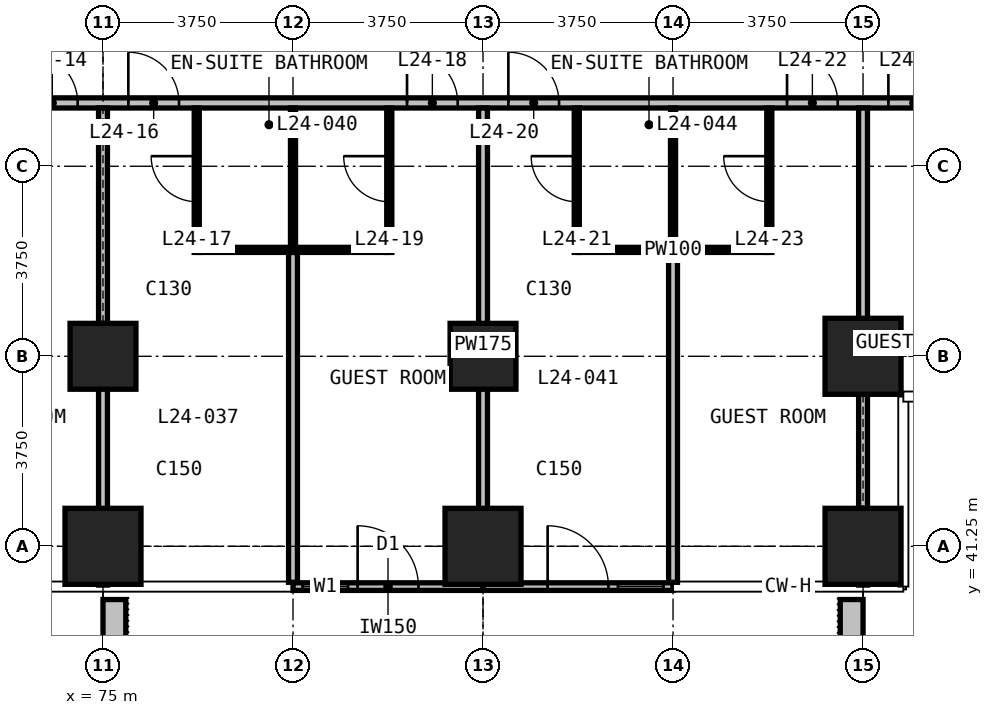
"""IFC4 building model, lengths in metres.
Left out: names, types, materials, properties, quantities, classifications, styles, units other than length and angle.
Written with IfcOpenShell. Run it as: python <this file> out.ifc"""

import sys

from ifc_helpers import new_model, si_unit, direction, frame, frame_2d, origin, origin_2d, place, context, subcontext, project, spatial, rectangle, extrude, element, fill, save


model = new_model("IFC4")
c1 = context("Model", 3, precision=1e-05, world=origin(), true_north=direction((0.0, 1.0)))
c2 = subcontext(c1, "Body", "Model", "MODEL_VIEW")
j1 = project(units=[si_unit("LENGTHUNIT", "METRE"), si_unit("PLANEANGLEUNIT", "RADIAN")], contexts=[c1])
p1 = place(None, origin())
s1 = spatial("IfcSite", under=j1, at=p1, CompositionType="ELEMENT")
p2 = place(p1, origin())
s2 = spatial("IfcBuilding", under=s1, at=p2, CompositionType="ELEMENT")
p3 = place(p2, frame((0.0, 0.0, 98.9)))
s3 = spatial("IfcBuildingStorey", under=s2, at=p3, CompositionType="ELEMENT", Elevation=98.9)
p4 = place(p3, frame((75.0, 41.25, 0.0), z_axis=(0.0, 0.0, 1.0), x_axis=(1.0, 0.0, 0.0)))
e1 = element("IfcColumn", 1, at=p4, inside=s3, PredefinedType="COLUMN", context=c2, shape_type="SweptSolid", body=[
    extrude(rectangle(XDim=1.5, YDim=1.5, at=origin_2d()), origin(), (0.0, 0.0, 1.0), 3.3),
])
p5 = place(p3, frame((75.0, 45.0, 0.0), z_axis=(0.0, 0.0, 1.0), x_axis=(1.0, 0.0, 0.0)))
e2 = element("IfcColumn", 2, at=p5, inside=s3, PredefinedType="COLUMN", context=c2, shape_type="SweptSolid", body=[
    extrude(rectangle(XDim=1.3, YDim=1.3, at=origin_2d()), origin(), (0.0, 0.0, 1.0), 3.3),
])
p6 = place(p3, frame((82.5, 41.25, 0.0), z_axis=(0.0, 0.0, 1.0), x_axis=(1.0, 0.0, 0.0)))
e3 = element("IfcColumn", 3, at=p6, inside=s3, PredefinedType="COLUMN", context=c2, shape_type="SweptSolid", body=[
    extrude(rectangle(XDim=1.5, YDim=1.5, at=origin_2d()), origin(), (0.0, 0.0, 1.0), 3.3),
])
p7 = place(p3, frame((82.5, 45.0, 0.0), z_axis=(0.0, 0.0, 1.0), x_axis=(1.0, 0.0, 0.0)))
e4 = element("IfcColumn", 4, at=p7, inside=s3, PredefinedType="COLUMN", context=c2, shape_type="SweptSolid", body=[
    extrude(rectangle(XDim=1.3, YDim=1.3, at=origin_2d()), origin(), (0.0, 0.0, 1.0), 3.3),
])
for number, where, z_axis, x_axis in (
    (5, (90.0, 41.25, 0.0), (0.0, 0.0, 1.0), (1.0, 0.0, 0.0)),
    (6, (90.0, 45.0, 0.0), (0.0, 0.0, 1.0), (1.0, 0.0, 0.0)),
):
    element("IfcColumn", number, at=place(p3, frame(where, z_axis=z_axis, x_axis=x_axis)), inside=s3, PredefinedType="COLUMN", context=c2, shape_type="SweptSolid", body=[
        extrude(rectangle(XDim=1.5, YDim=1.5, at=origin_2d()), origin(), (0.0, 0.0, 1.0), 3.3),
    ])
p8 = place(p3, frame((78.75, 40.455, 0.0), z_axis=(0.0, 0.0, 1.0), x_axis=(1.0, 0.0, 0.0)))
e7 = element("IfcWall", 7, at=p8, inside=s3, PredefinedType="SOLIDWALL", context=c2, shape_type="SweptSolid", body=[
    extrude(rectangle(XDim=3.75, YDim=0.15, at=frame_2d((1.875, 0.0))), origin(), (0.0, 0.0, 1.0), 2.95),
])
p9 = place(p8, frame((0.188, 0.0, 0.1)))
e8 = element("IfcOpeningElement", 8, at=p9, cuts=e7, PredefinedType="OPENING", context=c2, shape_type="SweptSolid", body=[
    extrude(rectangle(XDim=0.9, YDim=2.4, at=frame_2d((0.45, 1.2))), frame((0.0, 0.085, 0.0), z_axis=(0.0, -1.0, 0.0), x_axis=(1.0, 0.0, 0.0)), (0.0, 0.0, 1.0), 0.17),
])
p10 = place(p8, frame((1.275, 0.0, 0.0)))
e9 = element("IfcOpeningElement", 9, at=p10, cuts=e7, PredefinedType="OPENING", context=c2, shape_type="SweptSolid", body=[
    extrude(rectangle(XDim=1.2, YDim=2.4, at=frame_2d((0.6, 1.2))), frame((0.0, 0.085, 0.0), z_axis=(0.0, -1.0, 0.0), x_axis=(1.0, 0.0, 0.0)), (0.0, 0.0, 1.0), 0.17),
])
p11 = place(p3, frame((82.5, 40.455, 0.0), z_axis=(0.0, 0.0, 1.0), x_axis=(1.0, 0.0, 0.0)))
e10 = element("IfcWall", 10, at=p11, inside=s3, PredefinedType="SOLIDWALL", context=c2, shape_type="SweptSolid", body=[
    extrude(rectangle(XDim=3.75, YDim=0.15, at=frame_2d((1.875, 0.0))), origin(), (0.0, 0.0, 1.0), 2.95),
])
p12 = place(p11, frame((1.275, 0.0, 0.0)))
e11 = element("IfcOpeningElement", 11, at=p12, cuts=e10, PredefinedType="OPENING", context=c2, shape_type="SweptSolid", body=[
    extrude(rectangle(XDim=1.2, YDim=2.4, at=frame_2d((0.6, 1.2))), frame((0.0, 0.085, 0.0), z_axis=(0.0, -1.0, 0.0), x_axis=(1.0, 0.0, 0.0)), (0.0, 0.0, 1.0), 0.17),
])
p13 = place(p11, frame((2.663, 0.0, 0.1)))
e12 = element("IfcOpeningElement", 12, at=p13, cuts=e10, PredefinedType="OPENING", context=c2, shape_type="SweptSolid", body=[
    extrude(rectangle(XDim=0.9, YDim=2.4, at=frame_2d((0.45, 1.2))), frame((0.0, 0.085, 0.0), z_axis=(0.0, -1.0, 0.0), x_axis=(1.0, 0.0, 0.0)), (0.0, 0.0, 1.0), 0.17),
])
for number, where, z_axis, x_axis in (
    (13, (75.225, 40.2, 0.0), (0.0, 0.0, 1.0), (0.0, -1.0, 0.0)),
    (14, (89.775, 40.2, 0.0), (0.0, 0.0, 1.0), (0.0, -1.0, 0.0)),
):
    element("IfcWall", number, at=place(p3, frame(where, z_axis=z_axis, x_axis=x_axis)), inside=s3, PredefinedType="USERDEFINED", context=c2, shape_type="SweptSolid", body=[
        extrude(rectangle(XDim=2.35, YDim=0.45, at=frame_2d((1.175, 0.0))), origin(), (0.0, 0.0, 1.0), 1.1),
    ])
p14 = place(p3, frame((52.575, 50.0, 0.0), z_axis=(0.0, 0.0, 1.0), x_axis=(1.0, 0.0, 0.0)))
e15 = element("IfcWall", 15, at=p14, inside=s3, PredefinedType="PARTITIONING", context=c2, shape_type="SweptSolid", body=[
    extrude(rectangle(XDim=44.85, YDim=0.2, at=frame_2d((22.425, 0.0))), origin(), (0.0, 0.0, 1.0), 2.95),
])
p15 = place(p14, frame((5.925, 0.0, 0.0)))
e16 = element("IfcOpeningElement", 16, at=p15, cuts=e15, PredefinedType="OPENING", context=c2, shape_type="SweptSolid", body=[
    extrude(rectangle(XDim=1.0, YDim=2.2, at=frame_2d((0.5, 1.1))), frame((0.0, 0.11, 0.0), z_axis=(0.0, -1.0, 0.0), x_axis=(1.0, 0.0, 0.0)), (0.0, 0.0, 1.0), 0.22),
])
p16 = place(p14, frame((7.925, 0.0, 0.0)))
e17 = element("IfcOpeningElement", 17, at=p16, cuts=e15, PredefinedType="OPENING", context=c2, shape_type="SweptSolid", body=[
    extrude(rectangle(XDim=1.0, YDim=2.2, at=frame_2d((0.5, 1.1))), frame((0.0, 0.11, 0.0), z_axis=(0.0, -1.0, 0.0), x_axis=(1.0, 0.0, 0.0)), (0.0, 0.0, 1.0), 0.22),
])
p17 = place(p14, frame((13.425, 0.0, 0.0)))
e18 = element("IfcOpeningElement", 18, at=p17, cuts=e15, PredefinedType="OPENING", context=c2, shape_type="SweptSolid", body=[
    extrude(rectangle(XDim=1.0, YDim=2.2, at=frame_2d((0.5, 1.1))), frame((0.0, 0.11, 0.0), z_axis=(0.0, -1.0, 0.0), x_axis=(1.0, 0.0, 0.0)), (0.0, 0.0, 1.0), 0.22),
])
p18 = place(p14, frame((15.425, 0.0, 0.0)))
e19 = element("IfcOpeningElement", 19, at=p18, cuts=e15, PredefinedType="OPENING", context=c2, shape_type="SweptSolid", body=[
    extrude(rectangle(XDim=1.0, YDim=2.2, at=frame_2d((0.5, 1.1))), frame((0.0, 0.11, 0.0), z_axis=(0.0, -1.0, 0.0), x_axis=(1.0, 0.0, 0.0)), (0.0, 0.0, 1.0), 0.22),
])
p19 = place(p14, frame((20.925, 0.0, 0.0)))
e20 = element("IfcOpeningElement", 20, at=p19, cuts=e15, PredefinedType="OPENING", context=c2, shape_type="SweptSolid", body=[
    extrude(rectangle(XDim=1.0, YDim=2.2, at=frame_2d((0.5, 1.1))), frame((0.0, 0.11, 0.0), z_axis=(0.0, -1.0, 0.0), x_axis=(1.0, 0.0, 0.0)), (0.0, 0.0, 1.0), 0.22),
])
p20 = place(p14, frame((22.925, 0.0, 0.0)))
e21 = element("IfcOpeningElement", 21, at=p20, cuts=e15, PredefinedType="OPENING", context=c2, shape_type="SweptSolid", body=[
    extrude(rectangle(XDim=1.0, YDim=2.2, at=frame_2d((0.5, 1.1))), frame((0.0, 0.11, 0.0), z_axis=(0.0, -1.0, 0.0), x_axis=(1.0, 0.0, 0.0)), (0.0, 0.0, 1.0), 0.22),
])
p21 = place(p14, frame((28.425, 0.0, 0.0)))
e22 = element("IfcOpeningElement", 22, at=p21, cuts=e15, PredefinedType="OPENING", context=c2, shape_type="SweptSolid", body=[
    extrude(rectangle(XDim=1.0, YDim=2.2, at=frame_2d((0.5, 1.1))), frame((0.0, 0.11, 0.0), z_axis=(0.0, -1.0, 0.0), x_axis=(1.0, 0.0, 0.0)), (0.0, 0.0, 1.0), 0.22),
])
p22 = place(p14, frame((30.425, 0.0, 0.0)))
e23 = element("IfcOpeningElement", 23, at=p22, cuts=e15, PredefinedType="OPENING", context=c2, shape_type="SweptSolid", body=[
    extrude(rectangle(XDim=1.0, YDim=2.2, at=frame_2d((0.5, 1.1))), frame((0.0, 0.11, 0.0), z_axis=(0.0, -1.0, 0.0), x_axis=(1.0, 0.0, 0.0)), (0.0, 0.0, 1.0), 0.22),
])
p23 = place(p14, frame((35.925, 0.0, 0.0)))
e24 = element("IfcOpeningElement", 24, at=p23, cuts=e15, PredefinedType="OPENING", context=c2, shape_type="SweptSolid", body=[
    extrude(rectangle(XDim=1.0, YDim=2.2, at=frame_2d((0.5, 1.1))), frame((0.0, 0.11, 0.0), z_axis=(0.0, -1.0, 0.0), x_axis=(1.0, 0.0, 0.0)), (0.0, 0.0, 1.0), 0.22),
])
p24 = place(p14, frame((37.925, 0.0, 0.0)))
e25 = element("IfcOpeningElement", 25, at=p24, cuts=e15, PredefinedType="OPENING", context=c2, shape_type="SweptSolid", body=[
    extrude(rectangle(XDim=1.0, YDim=2.2, at=frame_2d((0.5, 1.1))), frame((0.0, 0.11, 0.0), z_axis=(0.0, -1.0, 0.0), x_axis=(1.0, 0.0, 0.0)), (0.0, 0.0, 1.0), 0.22),
])
p25 = place(p14, frame((1.4, 0.0, 0.0)))
e26 = element("IfcOpeningElement", 26, at=p25, cuts=e15, PredefinedType="OPENING", context=c2, shape_type="SweptSolid", body=[
    extrude(rectangle(XDim=0.9, YDim=2.2, at=frame_2d((0.45, 1.1))), frame((0.0, 0.11, 0.0), z_axis=(0.0, -1.0, 0.0), x_axis=(1.0, 0.0, 0.0)), (0.0, 0.0, 1.0), 0.22),
])
p26 = place(p14, frame((42.575, 0.0, 0.0)))
e27 = element("IfcOpeningElement", 27, at=p26, cuts=e15, PredefinedType="OPENING", context=c2, shape_type="SweptSolid", body=[
    extrude(rectangle(XDim=0.9, YDim=2.2, at=frame_2d((0.45, 1.1))), frame((0.0, 0.11, 0.0), z_axis=(0.0, -1.0, 0.0), x_axis=(1.0, 0.0, 0.0)), (0.0, 0.0, 1.0), 0.22),
])
p27 = place(p3, frame((75.0, 40.485, 0.0), z_axis=(0.0, 0.0, 1.0), x_axis=(0.0, 1.0, 0.0)))
e28 = element("IfcWall", 28, at=p27, inside=s3, PredefinedType="PARTITIONING", context=c2, shape_type="SweptSolid", body=[
    extrude(rectangle(XDim=5.164, YDim=0.175, at=frame_2d((2.582, 0.0))), origin(), (0.0, 0.0, 1.0), 2.95),
])
p28 = place(p3, frame((75.0, 45.649, 0.0), z_axis=(0.0, 0.0, 1.0), x_axis=(0.0, 1.0, 0.0)))
e29 = element("IfcWall", 29, at=p28, inside=s3, PredefinedType="PARTITIONING", context=c2, shape_type="SweptSolid", body=[
    extrude(rectangle(XDim=4.251, YDim=0.175, at=frame_2d((2.125, 0.0))), origin(), (0.0, 0.0, 1.0), 2.05),
])
p29 = place(p3, frame((78.75, 40.54, 0.0), z_axis=(0.0, 0.0, 1.0), x_axis=(0.0, 1.0, 0.0)))
e30 = element("IfcWall", 30, at=p29, inside=s3, PredefinedType="PARTITIONING", context=c2, shape_type="SweptSolid", body=[
    extrude(rectangle(XDim=6.51, YDim=0.175, at=frame_2d((3.255, 0.0))), origin(), (0.0, 0.0, 1.0), 2.95),
])
p30 = place(p3, frame((82.5, 40.54, 0.0), z_axis=(0.0, 0.0, 1.0), x_axis=(0.0, 1.0, 0.0)))
e31 = element("IfcWall", 31, at=p30, inside=s3, PredefinedType="PARTITIONING", context=c2, shape_type="SweptSolid", body=[
    extrude(rectangle(XDim=9.36, YDim=0.175, at=frame_2d((4.68, 0.0))), origin(), (0.0, 0.0, 1.0), 2.95),
])
p31 = place(p3, frame((86.25, 40.54, 0.0), z_axis=(0.0, 0.0, 1.0), x_axis=(0.0, 1.0, 0.0)))
e32 = element("IfcWall", 32, at=p31, inside=s3, PredefinedType="PARTITIONING", context=c2, shape_type="SweptSolid", body=[
    extrude(rectangle(XDim=6.51, YDim=0.175, at=frame_2d((3.255, 0.0))), origin(), (0.0, 0.0, 1.0), 2.95),
])
p32 = place(p3, frame((90.0, 40.485, 0.0), z_axis=(0.0, 0.0, 1.0), x_axis=(0.0, 1.0, 0.0)))
e33 = element("IfcWall", 33, at=p32, inside=s3, PredefinedType="PARTITIONING", context=c2, shape_type="SweptSolid", body=[
    extrude(rectangle(XDim=1.515, YDim=0.175, at=frame_2d((0.757, 0.0))), origin(), (0.0, 0.0, 1.0), 2.95),
])
p33 = place(p3, frame((90.0, 42.0, 0.0), z_axis=(0.0, 0.0, 1.0), x_axis=(0.0, 1.0, 0.0)))
e34 = element("IfcWall", 34, at=p33, inside=s3, PredefinedType="PARTITIONING", context=c2, shape_type="SweptSolid", body=[
    extrude(rectangle(XDim=2.251, YDim=0.175, at=frame_2d((1.125, 0.0))), origin(), (0.0, 0.0, 1.0), 2.15),
])
p34 = place(p3, frame((90.0, 44.251, 0.0), z_axis=(0.0, 0.0, 1.0), x_axis=(0.0, 1.0, 0.0)))
e35 = element("IfcWall", 35, at=p34, inside=s3, PredefinedType="PARTITIONING", context=c2, shape_type="SweptSolid", body=[
    extrude(rectangle(XDim=5.649, YDim=0.175, at=frame_2d((2.824, 0.0))), origin(), (0.0, 0.0, 1.0), 2.95),
])
for number, where, z_axis, x_axis in (
    (36, (76.9, 47.1, 0.0), (0.0, 0.0, 1.0), (1.0, 0.0, 0.0)),
    (37, (84.4, 47.1, 0.0), (0.0, 0.0, 1.0), (1.0, 0.0, 0.0)),
):
    element("IfcWall", number, at=place(p3, frame(where, z_axis=z_axis, x_axis=x_axis)), inside=s3, PredefinedType="PARTITIONING", context=c2, shape_type="SweptSolid", body=[
        extrude(rectangle(XDim=3.7, YDim=0.1, at=frame_2d((1.85, 0.0))), origin(), (0.0, 0.0, 1.0), 2.95),
    ])
p35 = place(p3, frame((76.85, 47.05, 0.0), z_axis=(0.0, 0.0, 1.0), x_axis=(0.0, 1.0, 0.0)))
e38 = element("IfcWall", 38, at=p35, inside=s3, PredefinedType="PARTITIONING", context=c2, shape_type="SweptSolid", body=[
    extrude(rectangle(XDim=2.85, YDim=0.1, at=frame_2d((1.425, 0.0))), origin(), (0.0, 0.0, 1.0), 2.95),
])
p36 = place(p35, frame((1.0, 0.0, 0.0)))
e39 = element("IfcOpeningElement", 39, at=p36, cuts=e38, PredefinedType="OPENING", context=c2, shape_type="SweptSolid", body=[
    extrude(rectangle(XDim=0.9, YDim=2.2, at=frame_2d((0.45, 1.1))), frame((0.0, 0.06, 0.0), z_axis=(0.0, -1.0, 0.0), x_axis=(1.0, 0.0, 0.0)), (0.0, 0.0, 1.0), 0.12),
])
p37 = place(p3, frame((78.75, 47.15, 0.0), z_axis=(0.0, 0.0, 1.0), x_axis=(0.0, 1.0, 0.0)))
e40 = element("IfcWall", 40, at=p37, inside=s3, PredefinedType="PARTITIONING", context=c2, shape_type="SweptSolid", body=[
    extrude(rectangle(XDim=2.75, YDim=0.1, at=frame_2d((1.375, 0.0))), origin(), (0.0, 0.0, 1.0), 2.95),
])
p38 = place(p3, frame((80.65, 47.05, 0.0), z_axis=(0.0, 0.0, 1.0), x_axis=(0.0, 1.0, 0.0)))
e41 = element("IfcWall", 41, at=p38, inside=s3, PredefinedType="PARTITIONING", context=c2, shape_type="SweptSolid", body=[
    extrude(rectangle(XDim=2.85, YDim=0.1, at=frame_2d((1.425, 0.0))), origin(), (0.0, 0.0, 1.0), 2.95),
])
p39 = place(p38, frame((1.0, 0.0, 0.0)))
e42 = element("IfcOpeningElement", 42, at=p39, cuts=e41, PredefinedType="OPENING", context=c2, shape_type="SweptSolid", body=[
    extrude(rectangle(XDim=0.9, YDim=2.2, at=frame_2d((0.45, 1.1))), frame((0.0, 0.06, 0.0), z_axis=(0.0, -1.0, 0.0), x_axis=(1.0, 0.0, 0.0)), (0.0, 0.0, 1.0), 0.12),
])
p40 = place(p3, frame((84.35, 47.05, 0.0), z_axis=(0.0, 0.0, 1.0), x_axis=(0.0, 1.0, 0.0)))
e43 = element("IfcWall", 43, at=p40, inside=s3, PredefinedType="PARTITIONING", context=c2, shape_type="SweptSolid", body=[
    extrude(rectangle(XDim=2.85, YDim=0.1, at=frame_2d((1.425, 0.0))), origin(), (0.0, 0.0, 1.0), 2.95),
])
p41 = place(p40, frame((1.0, 0.0, 0.0)))
e44 = element("IfcOpeningElement", 44, at=p41, cuts=e43, PredefinedType="OPENING", context=c2, shape_type="SweptSolid", body=[
    extrude(rectangle(XDim=0.9, YDim=2.2, at=frame_2d((0.45, 1.1))), frame((0.0, 0.06, 0.0), z_axis=(0.0, -1.0, 0.0), x_axis=(1.0, 0.0, 0.0)), (0.0, 0.0, 1.0), 0.12),
])
p42 = place(p3, frame((86.25, 47.15, 0.0), z_axis=(0.0, 0.0, 1.0), x_axis=(0.0, 1.0, 0.0)))
e45 = element("IfcWall", 45, at=p42, inside=s3, PredefinedType="PARTITIONING", context=c2, shape_type="SweptSolid", body=[
    extrude(rectangle(XDim=2.75, YDim=0.1, at=frame_2d((1.375, 0.0))), origin(), (0.0, 0.0, 1.0), 2.95),
])
p43 = place(p3, frame((88.15, 47.05, 0.0), z_axis=(0.0, 0.0, 1.0), x_axis=(0.0, 1.0, 0.0)))
e46 = element("IfcWall", 46, at=p43, inside=s3, PredefinedType="PARTITIONING", context=c2, shape_type="SweptSolid", body=[
    extrude(rectangle(XDim=2.85, YDim=0.1, at=frame_2d((1.425, 0.0))), origin(), (0.0, 0.0, 1.0), 2.95),
])
p44 = place(p43, frame((1.0, 0.0, 0.0)))
e47 = element("IfcOpeningElement", 47, at=p44, cuts=e46, PredefinedType="OPENING", context=c2, shape_type="SweptSolid", body=[
    extrude(rectangle(XDim=0.9, YDim=2.2, at=frame_2d((0.45, 1.1))), frame((0.0, 0.06, 0.0), z_axis=(0.0, -1.0, 0.0), x_axis=(1.0, 0.0, 0.0)), (0.0, 0.0, 1.0), 0.12),
])
p45 = place(p9, origin())
e48 = element("IfcWindow", 48, at=p45, inside=s3, PartitioningType="SINGLE_PANEL", PredefinedType="WINDOW", context=c2, shape_type="SweptSolid", body=[
    extrude(rectangle(XDim=0.9, YDim=2.4, at=frame_2d((0.45, 1.2))), frame((0.0, 0.03, 0.0), z_axis=(0.0, -1.0, 0.0), x_axis=(1.0, 0.0, 0.0)), (0.0, 0.0, 1.0), 0.06),
])
fill(e8, e48)
p46 = place(p10, origin())
e49 = element("IfcDoor", 49, at=p46, inside=s3, OperationType="SINGLE_SWING_LEFT", PredefinedType="DOOR", context=c2, shape_type="SweptSolid", body=[
    extrude(rectangle(XDim=1.2, YDim=2.4, at=frame_2d((0.6, 1.2))), frame((0.0, 0.025, 0.0), z_axis=(0.0, -1.0, 0.0), x_axis=(1.0, 0.0, 0.0)), (0.0, 0.0, 1.0), 0.05),
])
fill(e9, e49)
p47 = place(p12, origin())
e50 = element("IfcDoor", 50, at=p47, inside=s3, OperationType="SINGLE_SWING_LEFT", PredefinedType="DOOR", context=c2, shape_type="SweptSolid", body=[
    extrude(rectangle(XDim=1.2, YDim=2.4, at=frame_2d((0.6, 1.2))), frame((0.0, 0.025, 0.0), z_axis=(0.0, -1.0, 0.0), x_axis=(1.0, 0.0, 0.0)), (0.0, 0.0, 1.0), 0.05),
])
fill(e11, e50)
p48 = place(p13, origin())
e51 = element("IfcWindow", 51, at=p48, inside=s3, PartitioningType="SINGLE_PANEL", PredefinedType="WINDOW", context=c2, shape_type="SweptSolid", body=[
    extrude(rectangle(XDim=0.9, YDim=2.4, at=frame_2d((0.45, 1.2))), frame((0.0, 0.03, 0.0), z_axis=(0.0, -1.0, 0.0), x_axis=(1.0, 0.0, 0.0)), (0.0, 0.0, 1.0), 0.06),
])
fill(e12, e51)
p49 = place(p19, origin())
e52 = element("IfcDoor", 52, at=p49, inside=s3, OperationType="SINGLE_SWING_LEFT", PredefinedType="DOOR", context=c2, shape_type="SweptSolid", body=[
    extrude(rectangle(XDim=1.0, YDim=2.2, at=frame_2d((0.5, 1.1))), frame((0.0, 0.025, 0.0), z_axis=(0.0, -1.0, 0.0), x_axis=(1.0, 0.0, 0.0)), (0.0, 0.0, 1.0), 0.05),
])
fill(e20, e52)
p50 = place(p20, origin())
e53 = element("IfcDoor", 53, at=p50, inside=s3, OperationType="SINGLE_SWING_LEFT", PredefinedType="DOOR", context=c2, shape_type="SweptSolid", body=[
    extrude(rectangle(XDim=1.0, YDim=2.2, at=frame_2d((0.5, 1.1))), frame((0.0, 0.025, 0.0), z_axis=(0.0, -1.0, 0.0), x_axis=(1.0, 0.0, 0.0)), (0.0, 0.0, 1.0), 0.05),
])
fill(e21, e53)
p51 = place(p36, origin())
e54 = element("IfcDoor", 54, at=p51, inside=s3, OperationType="SINGLE_SWING_RIGHT", PredefinedType="DOOR", context=c2, shape_type="SweptSolid", body=[
    extrude(rectangle(XDim=0.9, YDim=2.2, at=frame_2d((0.45, 1.1))), frame((0.0, 0.025, 0.0), z_axis=(0.0, -1.0, 0.0), x_axis=(1.0, 0.0, 0.0)), (0.0, 0.0, 1.0), 0.05),
])
fill(e39, e54)
p52 = place(p21, origin())
e55 = element("IfcDoor", 55, at=p52, inside=s3, OperationType="SINGLE_SWING_LEFT", PredefinedType="DOOR", context=c2, shape_type="SweptSolid", body=[
    extrude(rectangle(XDim=1.0, YDim=2.2, at=frame_2d((0.5, 1.1))), frame((0.0, 0.025, 0.0), z_axis=(0.0, -1.0, 0.0), x_axis=(1.0, 0.0, 0.0)), (0.0, 0.0, 1.0), 0.05),
])
fill(e22, e55)
p53 = place(p39, origin())
e56 = element("IfcDoor", 56, at=p53, inside=s3, OperationType="SINGLE_SWING_RIGHT", PredefinedType="DOOR", context=c2, shape_type="SweptSolid", body=[
    extrude(rectangle(XDim=0.9, YDim=2.2, at=frame_2d((0.45, 1.1))), frame((0.0, 0.025, 0.0), z_axis=(0.0, -1.0, 0.0), x_axis=(1.0, 0.0, 0.0)), (0.0, 0.0, 1.0), 0.05),
])
fill(e42, e56)
p54 = place(p22, origin())
e57 = element("IfcDoor", 57, at=p54, inside=s3, OperationType="SINGLE_SWING_RIGHT", PredefinedType="DOOR", context=c2, shape_type="SweptSolid", body=[
    extrude(rectangle(XDim=1.0, YDim=2.2, at=frame_2d((0.5, 1.1))), frame((0.0, 0.025, 0.0), z_axis=(0.0, -1.0, 0.0), x_axis=(1.0, 0.0, 0.0)), (0.0, 0.0, 1.0), 0.05),
])
fill(e23, e57)
p55 = place(p41, origin())
e58 = element("IfcDoor", 58, at=p55, inside=s3, OperationType="SINGLE_SWING_RIGHT", PredefinedType="DOOR", context=c2, shape_type="SweptSolid", body=[
    extrude(rectangle(XDim=0.9, YDim=2.2, at=frame_2d((0.45, 1.1))), frame((0.0, 0.025, 0.0), z_axis=(0.0, -1.0, 0.0), x_axis=(1.0, 0.0, 0.0)), (0.0, 0.0, 1.0), 0.05),
])
fill(e44, e58)
p56 = place(p23, origin())
e59 = element("IfcDoor", 59, at=p56, inside=s3, OperationType="SINGLE_SWING_LEFT", PredefinedType="DOOR", context=c2, shape_type="SweptSolid", body=[
    extrude(rectangle(XDim=1.0, YDim=2.2, at=frame_2d((0.5, 1.1))), frame((0.0, 0.025, 0.0), z_axis=(0.0, -1.0, 0.0), x_axis=(1.0, 0.0, 0.0)), (0.0, 0.0, 1.0), 0.05),
])
fill(e24, e59)
p57 = place(p44, origin())
e60 = element("IfcDoor", 60, at=p57, inside=s3, OperationType="SINGLE_SWING_RIGHT", PredefinedType="DOOR", context=c2, shape_type="SweptSolid", body=[
    extrude(rectangle(XDim=0.9, YDim=2.2, at=frame_2d((0.45, 1.1))), frame((0.0, 0.025, 0.0), z_axis=(0.0, -1.0, 0.0), x_axis=(1.0, 0.0, 0.0)), (0.0, 0.0, 1.0), 0.05),
])
fill(e47, e60)
p58 = place(p24, origin())
e61 = element("IfcDoor", 61, at=p58, inside=s3, OperationType="SINGLE_SWING_LEFT", PredefinedType="DOOR", context=c2, shape_type="SweptSolid", body=[
    extrude(rectangle(XDim=1.0, YDim=2.2, at=frame_2d((0.5, 1.1))), frame((0.0, 0.025, 0.0), z_axis=(0.0, -1.0, 0.0), x_axis=(1.0, 0.0, 0.0)), (0.0, 0.0, 1.0), 0.05),
])
fill(e25, e61)
save(model, sys.argv[1])
